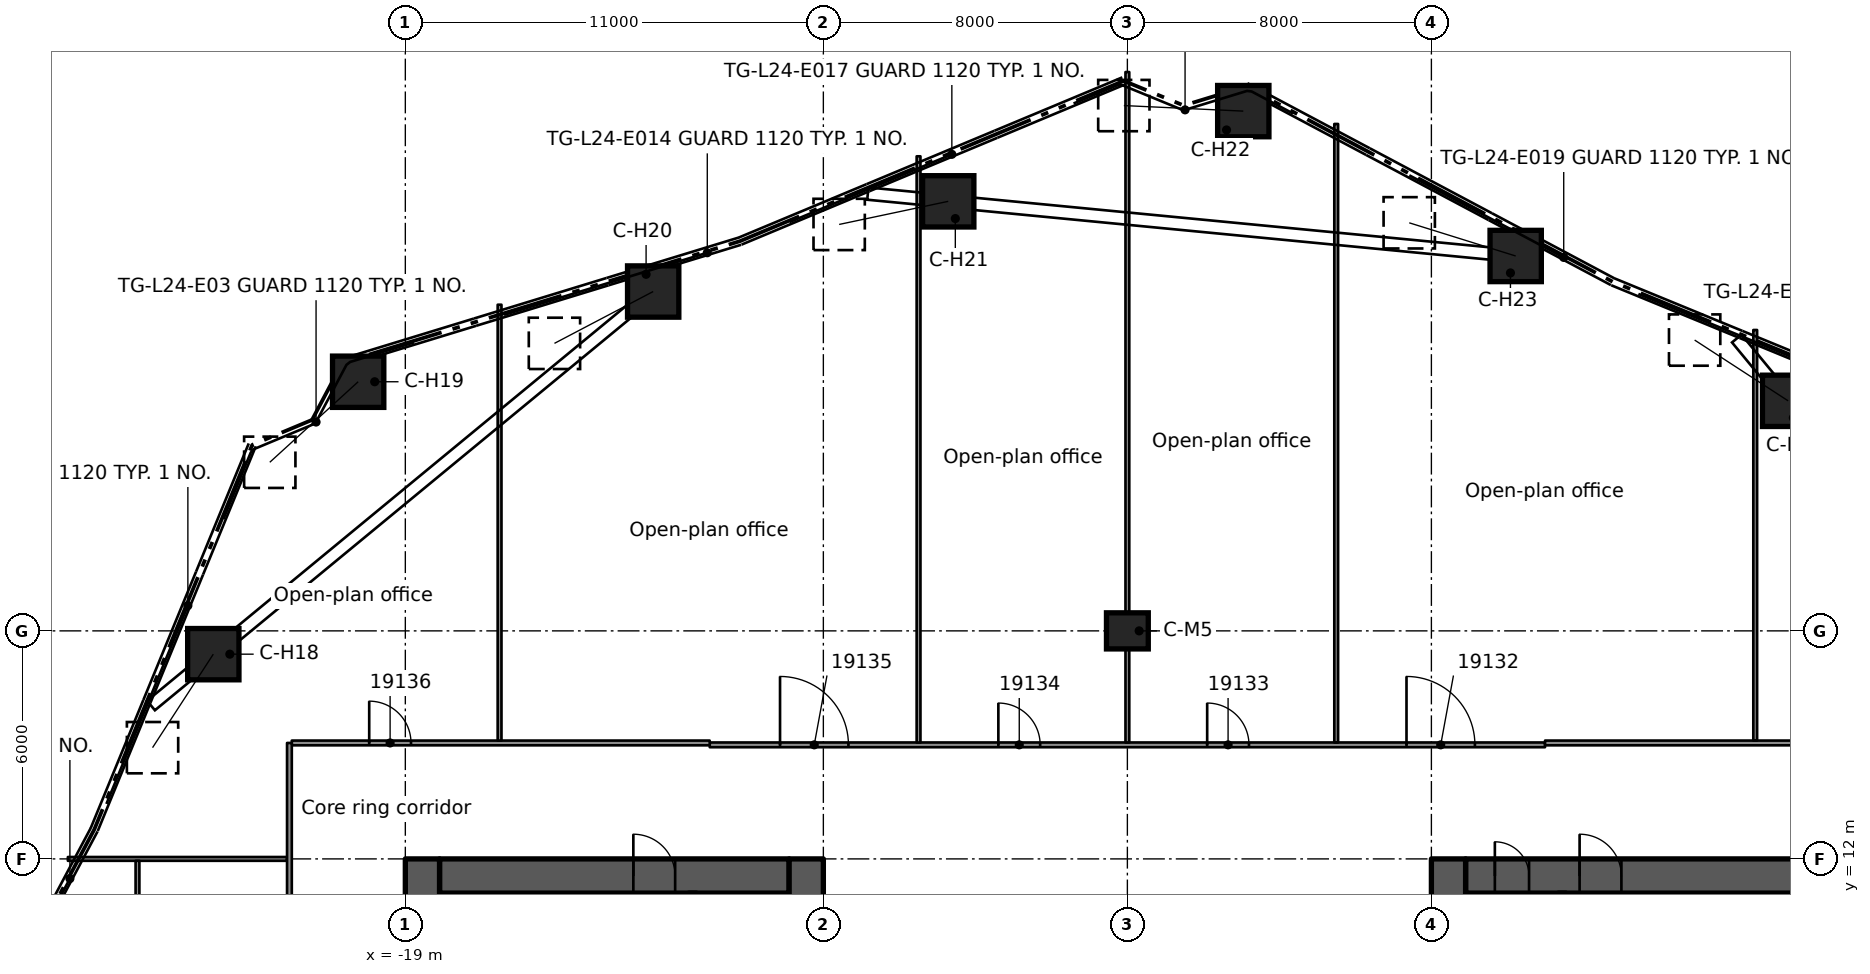
"""IFC4 building model, lengths in metres.
Left out: names, types, materials, properties, quantities, classifications, styles, units other than length and angle.
Written with IfcOpenShell. Run it as: python <this file> out.ifc"""

import sys

from ifc_helpers import new_model, si_unit, direction, frame, frame_2d, origin, origin_2d, place, context, subcontext, project, spatial, rectangle, extrude, element, fill, save


model = new_model("IFC4")
c1 = context("Model", 3, precision=1e-05, world=origin(), true_north=direction((0.0, 1.0)))
c2 = subcontext(c1, "Body", "Model", "MODEL_VIEW")
j1 = project(units=[si_unit("LENGTHUNIT", "METRE"), si_unit("PLANEANGLEUNIT", "RADIAN")], contexts=[c1])
p1 = place(None, origin())
s1 = spatial("IfcSite", under=j1, at=p1, CompositionType="ELEMENT")
p2 = place(p1, origin())
s2 = spatial("IfcBuilding", under=s1, at=p2, CompositionType="ELEMENT")
p3 = place(p2, frame((0.0, 0.0, 98.2)))
s3 = spatial("IfcBuildingStorey", under=s2, at=p3, CompositionType="ELEMENT", Elevation=98.2)
p4 = place(p3, frame((-18.1, 11.55, 0.0), z_axis=(0.0, 0.0, 1.0), x_axis=(1.0, 0.0, 0.0)))
e1 = element("IfcWall", 1, at=p4, inside=s3, PredefinedType="SHEAR", context=c2, shape_type="SweptSolid", body=[
    extrude(rectangle(XDim=9.2, YDim=0.9, at=frame_2d((4.6, 0.0))), origin(), (0.0, 0.0, 1.0), 4.0),
])
p5 = place(p4, frame((5.1, 0.0, 0.0)))
e2 = element("IfcOpeningElement", 2, at=p5, cuts=e1, PredefinedType="OPENING", context=c2, shape_type="SweptSolid", body=[
    extrude(rectangle(XDim=1.1, YDim=2.1, at=frame_2d((0.55, 1.05))), frame((0.0, 0.46, 0.0), z_axis=(0.0, -1.0, 0.0), x_axis=(1.0, 0.0, 0.0)), (0.0, 0.0, 1.0), 0.92),
])
p6 = place(p3, frame((-18.55, -12.0, 0.0), z_axis=(0.0, 0.0, 1.0), x_axis=(0.0, 1.0, 0.0)))
e3 = element("IfcWall", 3, at=p6, inside=s3, PredefinedType="SHEAR", context=c2, shape_type="SweptSolid", body=[
    extrude(rectangle(XDim=24.0, YDim=0.9, at=frame_2d((12.0, 0.0))), origin(), (0.0, 0.0, 1.0), 4.0),
])
p7 = place(p6, frame((10.1, 0.0, 0.0)))
e4 = element("IfcOpeningElement", 4, at=p7, cuts=e3, PredefinedType="OPENING", context=c2, shape_type="SweptSolid", body=[
    extrude(rectangle(XDim=1.8, YDim=2.1, at=frame_2d((0.9, 1.05))), frame((0.0, 0.46, 0.0), z_axis=(0.0, -1.0, 0.0), x_axis=(1.0, 0.0, 0.0)), (0.0, 0.0, 1.0), 0.92),
])
p8 = place(p3, frame((-8.45, -12.0, 0.0), z_axis=(0.0, 0.0, 1.0), x_axis=(0.0, 1.0, 0.0)))
e5 = element("IfcWall", 5, at=p8, inside=s3, PredefinedType="SHEAR", context=c2, shape_type="SweptSolid", body=[
    extrude(rectangle(XDim=24.0, YDim=0.9, at=frame_2d((12.0, 0.0))), origin(), (0.0, 0.0, 1.0), 4.0),
])
p9 = place(p8, frame((9.6, 0.0, 0.0)))
e6 = element("IfcOpeningElement", 6, at=p9, cuts=e5, PredefinedType="OPENING", context=c2, shape_type="SweptSolid", body=[
    extrude(rectangle(XDim=1.8, YDim=2.1, at=frame_2d((0.9, 1.05))), frame((0.0, 0.46, 0.0), z_axis=(0.0, -1.0, 0.0), x_axis=(1.0, 0.0, 0.0)), (0.0, 0.0, 1.0), 0.92),
])
p10 = place(p8, frame((19.65, 0.0, 0.0)))
e7 = element("IfcOpeningElement", 7, at=p10, cuts=e5, PredefinedType="OPENING", context=c2, shape_type="SweptSolid", body=[
    extrude(rectangle(XDim=1.1, YDim=2.1, at=frame_2d((0.55, 1.05))), frame((0.0, 0.46, 0.0), z_axis=(0.0, -1.0, 0.0), x_axis=(1.0, 0.0, 0.0)), (0.0, 0.0, 1.0), 0.92),
])
p11 = place(p8, frame((2.2, 0.0, 0.0)))
e8 = element("IfcOpeningElement", 8, at=p11, cuts=e5, PredefinedType="OPENING", context=c2, shape_type="SweptSolid", body=[
    extrude(rectangle(XDim=0.8, YDim=2.1, at=frame_2d((0.4, 1.05))), frame((0.0, 0.46, 0.0), z_axis=(0.0, -1.0, 0.0), x_axis=(1.0, 0.0, 0.0)), (0.0, 0.0, 1.0), 0.92),
])
p12 = place(p3, frame((8.9, 11.55, 0.0), z_axis=(0.0, 0.0, 1.0), x_axis=(1.0, 0.0, 0.0)))
e9 = element("IfcWall", 9, at=p12, inside=s3, PredefinedType="SHEAR", context=c2, shape_type="SweptSolid", body=[
    extrude(rectangle(XDim=9.2, YDim=0.9, at=frame_2d((4.6, 0.0))), origin(), (0.0, 0.0, 1.0), 4.0),
])
p13 = place(p12, frame((3.0, 0.0, 0.0)))
e10 = element("IfcOpeningElement", 10, at=p13, cuts=e9, PredefinedType="OPENING", context=c2, shape_type="SweptSolid", body=[
    extrude(rectangle(XDim=1.1, YDim=2.1, at=frame_2d((0.55, 1.05))), frame((0.0, 0.46, 0.0), z_axis=(0.0, -1.0, 0.0), x_axis=(1.0, 0.0, 0.0)), (0.0, 0.0, 1.0), 0.92),
])
p14 = place(p12, frame((0.77, 0.0, 0.0)))
e11 = element("IfcOpeningElement", 11, at=p14, cuts=e9, PredefinedType="OPENING", context=c2, shape_type="SweptSolid", body=[
    extrude(rectangle(XDim=0.9, YDim=2.1, at=frame_2d((0.45, 1.05))), frame((0.0, 0.46, 0.0), z_axis=(0.0, -1.0, 0.0), x_axis=(1.0, 0.0, 0.0)), (0.0, 0.0, 1.0), 0.92),
])
p15 = place(p3, frame((8.45, -12.0, 0.0), z_axis=(0.0, 0.0, 1.0), x_axis=(0.0, 1.0, 0.0)))
e12 = element("IfcWall", 12, at=p15, inside=s3, PredefinedType="SHEAR", context=c2, shape_type="SweptSolid", body=[
    extrude(rectangle(XDim=24.0, YDim=0.9, at=frame_2d((12.0, 0.0))), origin(), (0.0, 0.0, 1.0), 4.0),
])
p16 = place(p15, frame((12.6, 0.0, 0.0)))
e13 = element("IfcOpeningElement", 13, at=p16, cuts=e12, PredefinedType="OPENING", context=c2, shape_type="SweptSolid", body=[
    extrude(rectangle(XDim=1.8, YDim=2.1, at=frame_2d((0.9, 1.05))), frame((0.0, 0.46, 0.0), z_axis=(0.0, -1.0, 0.0), x_axis=(1.0, 0.0, 0.0)), (0.0, 0.0, 1.0), 0.92),
])
p17 = place(p15, frame((3.25, 0.0, 0.0)))
e14 = element("IfcOpeningElement", 14, at=p17, cuts=e12, PredefinedType="OPENING", context=c2, shape_type="SweptSolid", body=[
    extrude(rectangle(XDim=1.1, YDim=2.1, at=frame_2d((0.55, 1.05))), frame((0.0, 0.46, 0.0), z_axis=(0.0, -1.0, 0.0), x_axis=(1.0, 0.0, 0.0)), (0.0, 0.0, 1.0), 0.92),
])
p18 = place(p15, frame((21.0, 0.0, 0.0)))
e15 = element("IfcOpeningElement", 15, at=p18, cuts=e12, PredefinedType="OPENING", context=c2, shape_type="SweptSolid", body=[
    extrude(rectangle(XDim=0.8, YDim=2.1, at=frame_2d((0.4, 1.05))), frame((0.0, 0.46, 0.0), z_axis=(0.0, -1.0, 0.0), x_axis=(1.0, 0.0, 0.0)), (0.0, 0.0, 1.0), 0.92),
])
p19 = place(p3, frame((-24.053, 17.387, 0.467), z_axis=(-0.376765381289, -0.57958595143, 0.722584232023), x_axis=(0.838420802366, -0.54502344735, 0.0)))
e16 = element("IfcColumn", 16, at=p19, inside=s3, PredefinedType="COLUMN", context=c2, shape_type="SweptSolid", body=[
    extrude(rectangle(XDim=1.35, YDim=1.35, at=origin_2d()), origin(), (0.0, 0.0, 1.0), 4.244),
])
p20 = place(p3, frame((-20.241, 24.555, 0.486), z_axis=(-0.532701381088, -0.485285534425, 0.693344927626), x_axis=(0.673441000997, -0.739240974363, 0.0)))
e17 = element("IfcColumn", 17, at=p20, inside=s3, PredefinedType="COLUMN", context=c2, shape_type="SweptSolid", body=[
    extrude(rectangle(XDim=1.35, YDim=1.35, at=origin_2d()), origin(), (0.0, 0.0, 1.0), 4.366),
])
p21 = place(p3, frame((-12.478, 26.929, 0.467), z_axis=(-0.612093610038, -0.32137646831, 0.722536212357), x_axis=(0.464864881362, -0.885381636401, 0.0)))
e18 = element("IfcColumn", 18, at=p21, inside=s3, PredefinedType="COLUMN", context=c2, shape_type="SweptSolid", body=[
    extrude(rectangle(XDim=1.35, YDim=1.35, at=origin_2d()), origin(), (0.0, 0.0, 1.0), 4.244),
])
p22 = place(p3, frame((-4.714, 29.302, 0.467), z_axis=(-0.676218305191, -0.14323977711, 0.722641799218), x_axis=(0.207226666249, -0.97829295653, 0.0)))
e19 = element("IfcColumn", 19, at=p22, inside=s3, PredefinedType="COLUMN", context=c2, shape_type="SweptSolid", body=[
    extrude(rectangle(XDim=1.35, YDim=1.35, at=origin_2d()), origin(), (0.0, 0.0, 1.0), 4.244),
])
p23 = place(p3, frame((3.05, 31.676, 0.486), z_axis=(-0.719838795512, 0.03343666302, 0.693335487366), x_axis=(-0.046400179673, -0.998922931625, 0.0)))
e20 = element("IfcColumn", 20, at=p23, inside=s3, PredefinedType="COLUMN", context=c2, shape_type="SweptSolid", body=[
    extrude(rectangle(XDim=1.35, YDim=1.35, at=origin_2d()), origin(), (0.0, 0.0, 1.0), 4.366),
])
for number, where, z_axis, x_axis in (
    (21, (10.218, 27.864, 0.467), (-0.66, 0.206, 0.723), (-0.298, -0.955, 0.0)),
    (22, (17.387, 24.053, 0.467), (-0.58, 0.377, 0.723), (-0.545, -0.838, 0.0)),
):
    element("IfcColumn", number, at=place(p3, frame(where, z_axis=z_axis, x_axis=x_axis)), inside=s3, PredefinedType="COLUMN", context=c2, shape_type="SweptSolid", body=[
        extrude(rectangle(XDim=1.35, YDim=1.35, at=origin_2d()), origin(), (0.0, 0.0, 1.0), 4.244),
    ])
p24 = place(p3, frame((0.0, 18.0, 0.0), z_axis=(0.0, 0.0, 1.0), x_axis=(1.0, 0.0, 0.0)))
e23 = element("IfcColumn", 23, at=p24, inside=s3, PredefinedType="COLUMN", context=c2, shape_type="SweptSolid", body=[
    extrude(rectangle(XDim=1.1, YDim=0.95, at=origin_2d()), origin(), (0.0, 0.0, 1.0), 4.0),
])
p25 = place(p3, frame((-11.44, 6.975, 0.0), z_axis=(0.0, 0.0, 1.0), x_axis=(0.0, 1.0, 0.0)))
e24 = element("IfcWall", 24, at=p25, inside=s3, PredefinedType="SOLIDWALL", context=c2, shape_type="SweptSolid", body=[
    extrude(rectangle(XDim=4.125, YDim=0.2, at=frame_2d((2.062, 0.0))), origin(), (0.0, 0.0, 1.0), 3.59),
])
p26 = place(p25, frame((2.1, 0.0, 0.0)))
e25 = element("IfcOpeningElement", 25, at=p26, cuts=e24, PredefinedType="OPENING", context=c2, shape_type="SweptSolid", body=[
    extrude(rectangle(XDim=1.1, YDim=2.1, at=frame_2d((0.55, 1.05))), frame((0.0, 0.11, 0.0), z_axis=(0.0, -1.0, 0.0), x_axis=(1.0, 0.0, 0.0)), (0.0, 0.0, 1.0), 0.22),
])
p27 = place(p3, frame((11.44, 11.1, 0.0), z_axis=(0.0, 0.0, 1.0), x_axis=(0.0, -1.0, 0.0)))
e26 = element("IfcWall", 26, at=p27, inside=s3, PredefinedType="SOLIDWALL", context=c2, shape_type="SweptSolid", body=[
    extrude(rectangle(XDim=4.125, YDim=0.2, at=frame_2d((2.062, 0.0))), origin(), (0.0, 0.0, 1.0), 3.59),
])
p28 = place(p3, frame((-27.88, 12.0, 0.0), z_axis=(0.0, 0.0, 1.0), x_axis=(1.0, 0.0, 0.0)))
e27 = element("IfcWall", 27, at=p28, inside=s3, PredefinedType="PARTITIONING", context=c2, shape_type="SweptSolid", body=[
    extrude(rectangle(XDim=5.767, YDim=0.1, at=frame_2d((2.883, 0.0))), origin(), (0.0, 0.0, 1.0), 3.58),
])
p29 = place(p3, frame((-10.99, 15.001, 0.0), z_axis=(0.0, 0.0, 1.0), x_axis=(1.0, 0.0, 0.0)))
e28 = element("IfcWall", 28, at=p29, inside=s3, PredefinedType="PARTITIONING", context=c2, shape_type="SweptSolid", body=[
    extrude(rectangle(XDim=21.98, YDim=0.125, at=frame_2d((10.99, 0.0))), origin(), (0.0, 0.0, 1.0), 3.58),
])
p30 = place(p29, frame((18.335, 0.0, 0.0)))
e29 = element("IfcOpeningElement", 29, at=p30, cuts=e28, PredefinedType="OPENING", context=c2, shape_type="SweptSolid", body=[
    extrude(rectangle(XDim=1.8, YDim=2.1, at=frame_2d((0.9, 1.05))), frame((0.0, 0.073, 0.0), z_axis=(0.0, -1.0, 0.0), x_axis=(1.0, 0.0, 0.0)), (0.0, 0.0, 1.0), 0.145),
])
p31 = place(p29, frame((13.09, 0.0, 0.0)))
e30 = element("IfcOpeningElement", 30, at=p31, cuts=e28, PredefinedType="OPENING", context=c2, shape_type="SweptSolid", body=[
    extrude(rectangle(XDim=1.1, YDim=2.1, at=frame_2d((0.55, 1.05))), frame((0.0, 0.073, 0.0), z_axis=(0.0, -1.0, 0.0), x_axis=(1.0, 0.0, 0.0)), (0.0, 0.0, 1.0), 0.145),
])
p32 = place(p29, frame((7.595, 0.0, 0.0)))
e31 = element("IfcOpeningElement", 31, at=p32, cuts=e28, PredefinedType="OPENING", context=c2, shape_type="SweptSolid", body=[
    extrude(rectangle(XDim=1.1, YDim=2.1, at=frame_2d((0.55, 1.05))), frame((0.0, 0.073, 0.0), z_axis=(0.0, -1.0, 0.0), x_axis=(1.0, 0.0, 0.0)), (0.0, 0.0, 1.0), 0.145),
])
p33 = place(p29, frame((1.85, 0.0, 0.0)))
e32 = element("IfcOpeningElement", 32, at=p33, cuts=e28, PredefinedType="OPENING", context=c2, shape_type="SweptSolid", body=[
    extrude(rectangle(XDim=1.8, YDim=2.1, at=frame_2d((0.9, 1.05))), frame((0.0, 0.073, 0.0), z_axis=(0.0, -1.0, 0.0), x_axis=(1.0, 0.0, 0.0)), (0.0, 0.0, 1.0), 0.145),
])
p34 = place(p3, frame((-21.988, 15.051, 0.0), z_axis=(0.0, 0.0, 1.0), x_axis=(1.0, 0.0, 0.0)))
e33 = element("IfcWall", 33, at=p34, inside=s3, PredefinedType="PARTITIONING", context=c2, shape_type="SweptSolid", body=[
    extrude(rectangle(XDim=10.997, YDim=0.125, at=frame_2d((5.499, 0.0))), origin(), (0.0, 0.0, 1.0), 3.58),
])
p35 = place(p34, frame((2.038, 0.0, 0.0)))
e34 = element("IfcOpeningElement", 34, at=p35, cuts=e33, PredefinedType="OPENING", context=c2, shape_type="SweptSolid", body=[
    extrude(rectangle(XDim=1.1, YDim=2.1, at=frame_2d((0.55, 1.05))), frame((0.0, 0.073, 0.0), z_axis=(0.0, -1.0, 0.0), x_axis=(1.0, 0.0, 0.0)), (0.0, 0.0, 1.0), 0.145),
])
p36 = place(p3, frame((10.991, 15.051, 0.0), z_axis=(0.0, 0.0, 1.0), x_axis=(1.0, 0.0, 0.0)))
e35 = element("IfcWall", 35, at=p36, inside=s3, PredefinedType="PARTITIONING", context=c2, shape_type="SweptSolid", body=[
    extrude(rectangle(XDim=10.997, YDim=0.125, at=frame_2d((5.499, 0.0))), origin(), (0.0, 0.0, 1.0), 3.58),
])
p37 = place(p36, frame((7.63, 0.0, 0.0)))
e36 = element("IfcOpeningElement", 36, at=p37, cuts=e35, PredefinedType="OPENING", context=c2, shape_type="SweptSolid", body=[
    extrude(rectangle(XDim=1.1, YDim=2.1, at=frame_2d((0.55, 1.05))), frame((0.0, 0.073, 0.0), z_axis=(0.0, -1.0, 0.0), x_axis=(1.0, 0.0, 0.0)), (0.0, 0.0, 1.0), 0.145),
])
p38 = place(p3, frame((16.521, 15.114, 0.0), z_axis=(0.0, 0.0, 1.0), x_axis=(0.0, 1.0, 0.0)))
e37 = element("IfcWall", 37, at=p38, inside=s3, PredefinedType="PARTITIONING", context=c2, shape_type="SweptSolid", body=[
    extrude(rectangle(XDim=10.803, YDim=0.1, at=frame_2d((5.401, 0.0))), origin(), (0.0, 0.0, 1.0), 3.58),
])
p39 = place(p3, frame((5.495, 15.063, 0.0), z_axis=(0.0, 0.0, 1.0), x_axis=(0.0, 1.0, 0.0)))
e38 = element("IfcWall", 38, at=p39, inside=s3, PredefinedType="PARTITIONING", context=c2, shape_type="SweptSolid", body=[
    extrude(rectangle(XDim=16.275, YDim=0.1, at=frame_2d((8.137, 0.0))), origin(), (0.0, 0.0, 1.0), 3.58),
])
p40 = place(p3, frame((0.0, 15.063, 0.0), z_axis=(0.0, 0.0, 1.0), x_axis=(0.0, 1.0, 0.0)))
e39 = element("IfcWall", 39, at=p40, inside=s3, PredefinedType="PARTITIONING", context=c2, shape_type="SweptSolid", body=[
    extrude(rectangle(XDim=17.641, YDim=0.1, at=frame_2d((8.821, 0.0))), origin(), (0.0, 0.0, 1.0), 3.58),
])
p41 = place(p3, frame((-5.495, 15.063, 0.0), z_axis=(0.0, 0.0, 1.0), x_axis=(0.0, 1.0, 0.0)))
e40 = element("IfcWall", 40, at=p41, inside=s3, PredefinedType="PARTITIONING", context=c2, shape_type="SweptSolid", body=[
    extrude(rectangle(XDim=15.424, YDim=0.1, at=frame_2d((7.712, 0.0))), origin(), (0.0, 0.0, 1.0), 3.58),
])
p42 = place(p3, frame((-16.52, 15.114, 0.0), z_axis=(0.0, 0.0, 1.0), x_axis=(0.0, 1.0, 0.0)))
e41 = element("IfcWall", 41, at=p42, inside=s3, PredefinedType="PARTITIONING", context=c2, shape_type="SweptSolid", body=[
    extrude(rectangle(XDim=11.468, YDim=0.1, at=frame_2d((5.734, 0.0))), origin(), (0.0, 0.0, 1.0), 3.58),
])
p43 = place(p3, frame((-22.05, -15.042, 0.0), z_axis=(0.0, 0.0, 1.0), x_axis=(0.0, 1.0, 0.0)))
e42 = element("IfcWall", 42, at=p43, inside=s3, PredefinedType="PARTITIONING", context=c2, shape_type="SweptSolid", body=[
    extrude(rectangle(XDim=30.093, YDim=0.125, at=frame_2d((15.046, 0.0))), origin(), (0.0, 0.0, 1.0), 3.58),
])
p44 = place(p43, frame((8.142, 0.0, 0.0)))
e43 = element("IfcOpeningElement", 43, at=p44, cuts=e42, PredefinedType="OPENING", context=c2, shape_type="SweptSolid", body=[
    extrude(rectangle(XDim=1.8, YDim=2.1, at=frame_2d((0.9, 1.05))), frame((0.0, 0.073, 0.0), z_axis=(0.0, -1.0, 0.0), x_axis=(1.0, 0.0, 0.0)), (0.0, 0.0, 1.0), 0.145),
])
p45 = place(p43, frame((0.85, 0.0, 0.0)))
e44 = element("IfcOpeningElement", 44, at=p45, cuts=e42, PredefinedType="OPENING", context=c2, shape_type="SweptSolid", body=[
    extrude(rectangle(XDim=1.1, YDim=2.1, at=frame_2d((0.55, 1.05))), frame((0.0, 0.073, 0.0), z_axis=(0.0, -1.0, 0.0), x_axis=(1.0, 0.0, 0.0)), (0.0, 0.0, 1.0), 0.145),
])
p46 = place(p43, frame((23.643, 0.0, 0.0)))
e45 = element("IfcOpeningElement", 45, at=p46, cuts=e42, PredefinedType="OPENING", context=c2, shape_type="SweptSolid", body=[
    extrude(rectangle(XDim=0.9, YDim=2.1, at=frame_2d((0.45, 1.05))), frame((0.0, 0.073, 0.0), z_axis=(0.0, -1.0, 0.0), x_axis=(1.0, 0.0, 0.0)), (0.0, 0.0, 1.0), 0.145),
])
p47 = place(p43, frame((17.394, 0.0, 0.0)))
e46 = element("IfcOpeningElement", 46, at=p47, cuts=e42, PredefinedType="OPENING", context=c2, shape_type="SweptSolid", body=[
    extrude(rectangle(XDim=1.1, YDim=2.1, at=frame_2d((0.55, 1.05))), frame((0.0, 0.073, 0.0), z_axis=(0.0, -1.0, 0.0), x_axis=(1.0, 0.0, 0.0)), (0.0, 0.0, 1.0), 0.145),
])
p48 = place(p3, frame((-26.048, 6.001, 0.0), z_axis=(0.0, 0.0, 1.0), x_axis=(0.0, 1.0, 0.0)))
e47 = element("IfcWall", 47, at=p48, inside=s3, PredefinedType="PARTITIONING", context=c2, shape_type="SweptSolid", body=[
    extrude(rectangle(XDim=5.949, YDim=0.1, at=frame_2d((2.975, 0.0))), origin(), (0.0, 0.0, 1.0), 3.58),
])
p49 = place(p5, origin())
e48 = element("IfcDoor", 48, at=p49, inside=s3, OperationType="SINGLE_SWING_RIGHT", PredefinedType="DOOR", context=c2, shape_type="SweptSolid", body=[
    extrude(rectangle(XDim=1.1, YDim=2.1, at=frame_2d((0.55, 1.05))), frame((0.0, 0.025, 0.0), z_axis=(0.0, -1.0, 0.0), x_axis=(1.0, 0.0, 0.0)), (0.0, 0.0, 1.0), 0.05),
])
fill(e2, e48)
p50 = place(p13, origin())
e49 = element("IfcDoor", 49, at=p50, inside=s3, OperationType="SINGLE_SWING_LEFT", PredefinedType="DOOR", context=c2, shape_type="SweptSolid", body=[
    extrude(rectangle(XDim=1.1, YDim=2.1, at=frame_2d((0.55, 1.05))), frame((0.0, 0.025, 0.0), z_axis=(0.0, -1.0, 0.0), x_axis=(1.0, 0.0, 0.0)), (0.0, 0.0, 1.0), 0.05),
])
fill(e10, e49)
p51 = place(p14, origin())
e50 = element("IfcDoor", 50, at=p51, inside=s3, OperationType="SINGLE_SWING_LEFT", PredefinedType="DOOR", context=c2, shape_type="SweptSolid", body=[
    extrude(rectangle(XDim=0.9, YDim=2.1, at=frame_2d((0.45, 1.05))), frame((0.0, 0.025, 0.0), z_axis=(0.0, -1.0, 0.0), x_axis=(1.0, 0.0, 0.0)), (0.0, 0.0, 1.0), 0.05),
])
fill(e11, e50)
p52 = place(p30, origin())
e51 = element("IfcDoor", 51, at=p52, inside=s3, OperationType="DOUBLE_DOOR_SINGLE_SWING", PredefinedType="DOOR", context=c2, shape_type="SweptSolid", body=[
    extrude(rectangle(XDim=1.8, YDim=2.1, at=frame_2d((0.9, 1.05))), frame((0.0, 0.025, 0.0), z_axis=(0.0, -1.0, 0.0), x_axis=(1.0, 0.0, 0.0)), (0.0, 0.0, 1.0), 0.05),
])
fill(e29, e51)
p53 = place(p31, origin())
e52 = element("IfcDoor", 52, at=p53, inside=s3, OperationType="SINGLE_SWING_RIGHT", PredefinedType="DOOR", context=c2, shape_type="SweptSolid", body=[
    extrude(rectangle(XDim=1.1, YDim=2.1, at=frame_2d((0.55, 1.05))), frame((0.0, 0.025, 0.0), z_axis=(0.0, -1.0, 0.0), x_axis=(1.0, 0.0, 0.0)), (0.0, 0.0, 1.0), 0.05),
])
fill(e30, e52)
p54 = place(p32, origin())
e53 = element("IfcDoor", 53, at=p54, inside=s3, OperationType="SINGLE_SWING_LEFT", PredefinedType="DOOR", context=c2, shape_type="SweptSolid", body=[
    extrude(rectangle(XDim=1.1, YDim=2.1, at=frame_2d((0.55, 1.05))), frame((0.0, 0.025, 0.0), z_axis=(0.0, -1.0, 0.0), x_axis=(1.0, 0.0, 0.0)), (0.0, 0.0, 1.0), 0.05),
])
fill(e31, e53)
p55 = place(p33, origin())
e54 = element("IfcDoor", 54, at=p55, inside=s3, OperationType="DOUBLE_DOOR_SINGLE_SWING", PredefinedType="DOOR", context=c2, shape_type="SweptSolid", body=[
    extrude(rectangle(XDim=1.8, YDim=2.1, at=frame_2d((0.9, 1.05))), frame((0.0, 0.025, 0.0), z_axis=(0.0, -1.0, 0.0), x_axis=(1.0, 0.0, 0.0)), (0.0, 0.0, 1.0), 0.05),
])
fill(e32, e54)
p56 = place(p35, origin())
e55 = element("IfcDoor", 55, at=p56, inside=s3, OperationType="SINGLE_SWING_LEFT", PredefinedType="DOOR", context=c2, shape_type="SweptSolid", body=[
    extrude(rectangle(XDim=1.1, YDim=2.1, at=frame_2d((0.55, 1.05))), frame((0.0, 0.025, 0.0), z_axis=(0.0, -1.0, 0.0), x_axis=(1.0, 0.0, 0.0)), (0.0, 0.0, 1.0), 0.05),
])
fill(e34, e55)
save(model, sys.argv[1])
